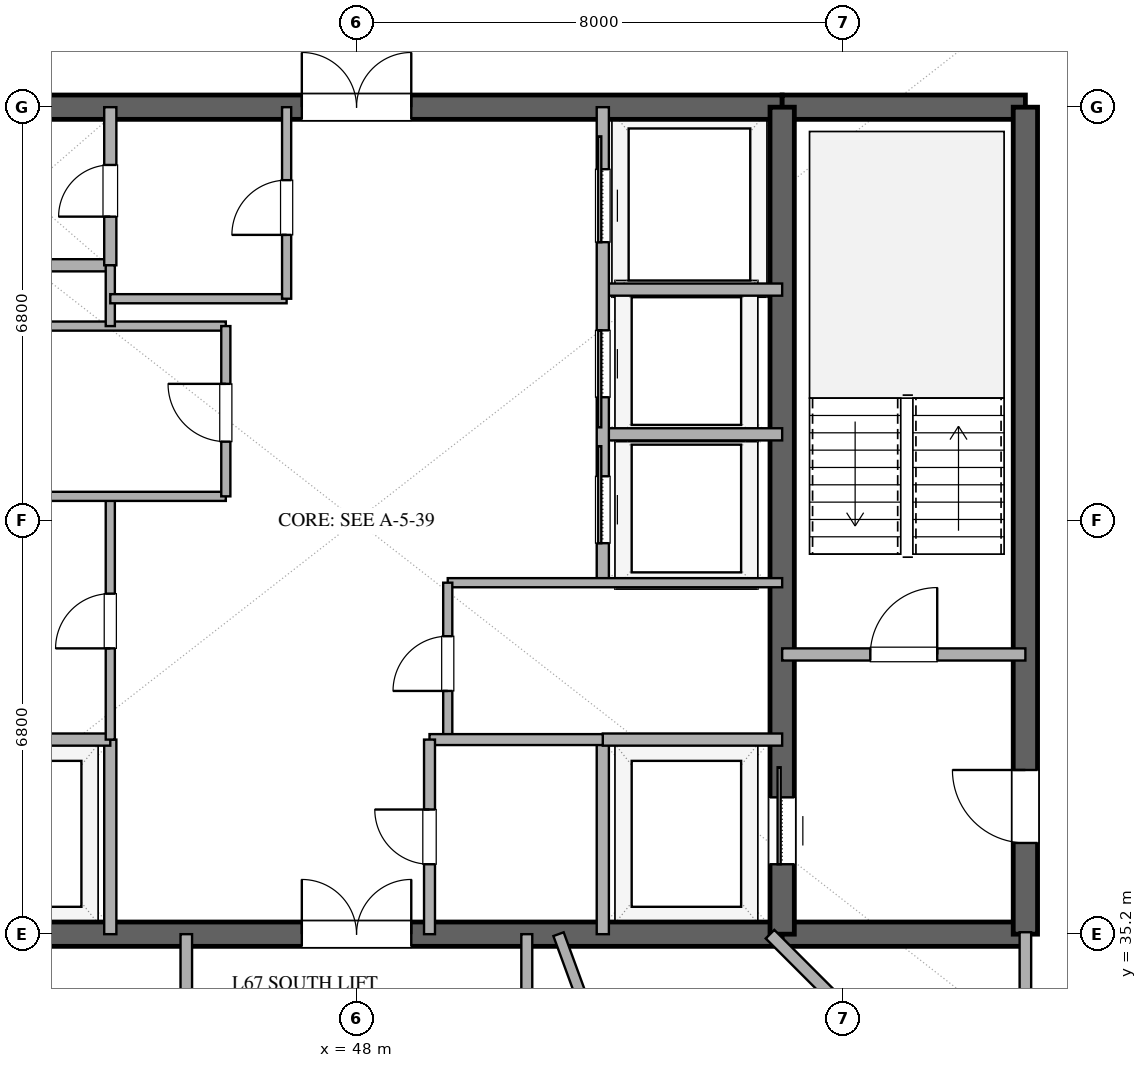
"""IFC4 building model, lengths in metres.
Left out: names, types, materials, properties, quantities, classifications, styles, units other than length and angle.
Written with IfcOpenShell. Run it as: python <this file> out.ifc"""

import sys

from ifc_helpers import new_model, si_unit, direction, frame, frame_2d, origin, place, context, subcontext, project, spatial, rectangle, extrude, element, fill, save


model = new_model("IFC4")
c1 = context("Model", 3, precision=1e-05, world=origin(), true_north=direction((0.0, 1.0)))
c2 = subcontext(c1, "Body", "Model", "MODEL_VIEW")
j1 = project(units=[si_unit("LENGTHUNIT", "METRE"), si_unit("PLANEANGLEUNIT", "RADIAN")], contexts=[c1])
p1 = place(None, origin())
s1 = spatial("IfcSite", under=j1, at=p1, CompositionType="ELEMENT")
p2 = place(p1, origin())
s2 = spatial("IfcBuilding", under=s1, at=p2, CompositionType="ELEMENT")
p3 = place(p2, frame((0.0, 0.0, 262.2)))
s3 = spatial("IfcBuildingStorey", under=s2, at=p3, CompositionType="ELEMENT", Elevation=262.2)
p4 = place(p3, frame((41.0, 35.2, 0.0), z_axis=(0.0, 0.0, 1.0), x_axis=(1.0, 0.0, 0.0)))
e1 = element("IfcWall", 1, at=p4, inside=s3, PredefinedType="SHEAR", context=c2, shape_type="SweptSolid", body=[
    extrude(rectangle(XDim=14.0, YDim=0.4, at=frame_2d((7.0, 0.0))), origin(), (0.0, 0.0, 1.0), 3.37),
])
p5 = place(p4, frame((6.1, 0.0, 0.0)))
e2 = element("IfcOpeningElement", 2, at=p5, cuts=e1, PredefinedType="OPENING", context=c2, shape_type="SweptSolid", body=[
    extrude(rectangle(XDim=1.8, YDim=2.25, at=frame_2d((0.9, 1.125))), frame((0.0, 0.21, 0.0), z_axis=(0.0, -1.0, 0.0), x_axis=(1.0, 0.0, 0.0)), (0.0, 0.0, 1.0), 0.42),
])
p6 = place(p3, frame((55.0, 35.2, 0.0), z_axis=(0.0, 0.0, 1.0), x_axis=(1.0, 0.0, 0.0)))
e3 = element("IfcWall", 3, at=p6, inside=s3, PredefinedType="SHEAR", context=c2, shape_type="SweptSolid", body=[
    extrude(rectangle(XDim=4.0, YDim=0.4, at=frame_2d((2.0, 0.0))), origin(), (0.0, 0.0, 1.0), 3.37),
])
p7 = place(p3, frame((41.0, 48.8, 0.0), z_axis=(0.0, 0.0, 1.0), x_axis=(1.0, 0.0, 0.0)))
e4 = element("IfcWall", 4, at=p7, inside=s3, PredefinedType="SHEAR", context=c2, shape_type="SweptSolid", body=[
    extrude(rectangle(XDim=14.0, YDim=0.4, at=frame_2d((7.0, 0.0))), origin(), (0.0, 0.0, 1.0), 3.37),
])
p8 = place(p7, frame((6.1, 0.0, 0.0)))
e5 = element("IfcOpeningElement", 5, at=p8, cuts=e4, PredefinedType="OPENING", context=c2, shape_type="SweptSolid", body=[
    extrude(rectangle(XDim=1.8, YDim=2.25, at=frame_2d((0.9, 1.125))), frame((0.0, 0.21, 0.0), z_axis=(0.0, -1.0, 0.0), x_axis=(1.0, 0.0, 0.0)), (0.0, 0.0, 1.0), 0.42),
])
p9 = place(p3, frame((55.0, 48.8, 0.0), z_axis=(0.0, 0.0, 1.0), x_axis=(1.0, 0.0, 0.0)))
e6 = element("IfcWall", 6, at=p9, inside=s3, PredefinedType="SHEAR", context=c2, shape_type="SweptSolid", body=[
    extrude(rectangle(XDim=4.0, YDim=0.4, at=frame_2d((2.0, 0.0))), origin(), (0.0, 0.0, 1.0), 3.37),
])
p10 = place(p3, frame((59.0, 35.2, 0.0), z_axis=(0.0, 0.0, 1.0), x_axis=(0.0, 1.0, 0.0)))
e7 = element("IfcWall", 7, at=p10, inside=s3, PredefinedType="SHEAR", context=c2, shape_type="SweptSolid", body=[
    extrude(rectangle(XDim=13.6, YDim=0.4, at=frame_2d((6.8, 0.0))), origin(), (0.0, 0.0, 1.0), 3.37),
])
p11 = place(p10, frame((1.5, 0.0, 0.0)))
e8 = element("IfcOpeningElement", 8, at=p11, cuts=e7, PredefinedType="OPENING", context=c2, shape_type="SweptSolid", body=[
    extrude(rectangle(XDim=1.2, YDim=2.15, at=frame_2d((0.6, 1.075))), frame((0.0, 0.21, 0.0), z_axis=(0.0, -1.0, 0.0), x_axis=(1.0, 0.0, 0.0)), (0.0, 0.0, 1.0), 0.42),
])
p12 = place(p3, frame((55.0, 35.2, 0.0), z_axis=(0.0, 0.0, 1.0), x_axis=(0.0, 1.0, 0.0)))
e9 = element("IfcWall", 9, at=p12, inside=s3, PredefinedType="SHEAR", context=c2, shape_type="SweptSolid", body=[
    extrude(rectangle(XDim=13.6, YDim=0.4, at=frame_2d((6.8, 0.0))), origin(), (0.0, 0.0, 1.0), 3.37),
])
p13 = place(p12, frame((1.15, 0.0, 0.0)))
e10 = element("IfcOpeningElement", 10, at=p13, cuts=e9, PredefinedType="OPENING", context=c2, shape_type="SweptSolid", body=[
    extrude(rectangle(XDim=1.1, YDim=2.2, at=frame_2d((0.55, 1.1))), frame((0.0, 0.21, 0.0), z_axis=(0.0, -1.0, 0.0), x_axis=(1.0, 0.0, 0.0)), (0.0, 0.0, 1.0), 0.42),
])
p14 = place(p3, frame((55.0, 39.8, 0.0), z_axis=(0.0, 0.0, 1.0), x_axis=(1.0, 0.0, 0.0)))
e11 = element("IfcWall", 11, at=p14, inside=s3, PredefinedType="SOLIDWALL", context=c2, shape_type="SweptSolid", body=[
    extrude(rectangle(XDim=4.0, YDim=0.2, at=frame_2d((2.0, 0.0))), origin(), (0.0, 0.0, 1.0), 2.73),
])
p15 = place(p14, frame((1.45, 0.0, 0.0)))
e12 = element("IfcOpeningElement", 12, at=p15, cuts=e11, PredefinedType="OPENING", context=c2, shape_type="SweptSolid", body=[
    extrude(rectangle(XDim=1.1, YDim=2.15, at=frame_2d((0.55, 1.075))), frame((0.0, 0.11, 0.0), z_axis=(0.0, -1.0, 0.0), x_axis=(1.0, 0.0, 0.0)), (0.0, 0.0, 1.0), 0.22),
])
p16 = place(p3, frame((43.95, 35.2, 0.0), z_axis=(0.0, 0.0, 1.0), x_axis=(0.0, 1.0, 0.0)))
e13 = element("IfcWall", 13, at=p16, inside=s3, PredefinedType="SOLIDWALL", context=c2, shape_type="SweptSolid", body=[
    extrude(rectangle(XDim=3.2, YDim=0.2, at=frame_2d((1.6, 0.0))), origin(), (0.0, 0.0, 1.0), 2.73),
])
p17 = place(p3, frame((41.0, 38.4, 0.0), z_axis=(0.0, 0.0, 1.0), x_axis=(1.0, 0.0, 0.0)))
e14 = element("IfcWall", 14, at=p17, inside=s3, PredefinedType="SOLIDWALL", context=c2, shape_type="SweptSolid", body=[
    extrude(rectangle(XDim=2.95, YDim=0.2, at=frame_2d((1.475, 0.0))), origin(), (0.0, 0.0, 1.0), 2.73),
])
p18 = place(p3, frame((52.05, 35.2, 0.0), z_axis=(0.0, 0.0, 1.0), x_axis=(0.0, 1.0, 0.0)))
e15 = element("IfcWall", 15, at=p18, inside=s3, PredefinedType="SOLIDWALL", context=c2, shape_type="SweptSolid", body=[
    extrude(rectangle(XDim=3.2, YDim=0.2, at=frame_2d((1.6, 0.0))), origin(), (0.0, 0.0, 1.0), 2.73),
])
for number, where, z_axis, x_axis in (
    (16, (52.05, 38.4, 0.0), (0.0, 0.0, 1.0), (1.0, 0.0, 0.0)),
    (17, (41.0, 46.2, 0.0), (0.0, 0.0, 1.0), (1.0, 0.0, 0.0)),
):
    element("IfcWall", number, at=place(p3, frame(where, z_axis=z_axis, x_axis=x_axis)), inside=s3, PredefinedType="SOLIDWALL", context=c2, shape_type="SweptSolid", body=[
        extrude(rectangle(XDim=2.95, YDim=0.2, at=frame_2d((1.475, 0.0))), origin(), (0.0, 0.0, 1.0), 2.73),
    ])
p19 = place(p3, frame((43.95, 46.2, 0.0), z_axis=(0.0, 0.0, 1.0), x_axis=(0.0, 1.0, 0.0)))
e18 = element("IfcWall", 18, at=p19, inside=s3, PredefinedType="SOLIDWALL", context=c2, shape_type="SweptSolid", body=[
    extrude(rectangle(XDim=2.6, YDim=0.2, at=frame_2d((1.3, 0.0))), origin(), (0.0, 0.0, 1.0), 2.73),
])
p20 = place(p19, frame((0.8, 0.0, 0.0)))
e19 = element("IfcOpeningElement", 19, at=p20, cuts=e18, PredefinedType="OPENING", context=c2, shape_type="SweptSolid", body=[
    extrude(rectangle(XDim=0.85, YDim=2.15, at=frame_2d((0.425, 1.075))), frame((0.0, 0.11, 0.0), z_axis=(0.0, -1.0, 0.0), x_axis=(1.0, 0.0, 0.0)), (0.0, 0.0, 1.0), 0.22),
])
p21 = place(p3, frame((43.95, 38.4, 0.0), z_axis=(0.0, 0.0, 1.0), x_axis=(0.0, 1.0, 0.0)))
e20 = element("IfcWall", 20, at=p21, inside=s3, PredefinedType="PARTITIONING", context=c2, shape_type="SweptSolid", body=[
    extrude(rectangle(XDim=4.0, YDim=0.15, at=frame_2d((2.0, 0.0))), origin(), (0.0, 0.0, 1.0), 2.73),
])
p22 = place(p21, frame((1.5, 0.0, 0.0)))
e21 = element("IfcOpeningElement", 21, at=p22, cuts=e20, PredefinedType="OPENING", context=c2, shape_type="SweptSolid", body=[
    extrude(rectangle(XDim=0.9, YDim=2.15, at=frame_2d((0.45, 1.075))), frame((0.0, 0.085, 0.0), z_axis=(0.0, -1.0, 0.0), x_axis=(1.0, 0.0, 0.0)), (0.0, 0.0, 1.0), 0.17),
])
for number, where, z_axis, x_axis in (
    (22, (41.0, 42.4, 0.0), (0.0, 0.0, 1.0), (1.0, 0.0, 0.0)),
    (23, (41.0, 45.2, 0.0), (0.0, 0.0, 1.0), (1.0, 0.0, 0.0)),
):
    element("IfcWall", number, at=place(p3, frame(where, z_axis=z_axis, x_axis=x_axis)), inside=s3, PredefinedType="PARTITIONING", context=c2, shape_type="SweptSolid", body=[
        extrude(rectangle(XDim=4.85, YDim=0.15, at=frame_2d((2.425, 0.0))), origin(), (0.0, 0.0, 1.0), 2.73),
    ])
p23 = place(p3, frame((43.95, 45.2, 0.0), z_axis=(0.0, 0.0, 1.0), x_axis=(0.0, 1.0, 0.0)))
e24 = element("IfcWall", 24, at=p23, inside=s3, PredefinedType="PARTITIONING", context=c2, shape_type="SweptSolid", body=[
    extrude(rectangle(XDim=1.0, YDim=0.15, at=frame_2d((0.5, 0.0))), origin(), (0.0, 0.0, 1.0), 2.73),
])
p24 = place(p3, frame((45.85, 42.4, 0.0), z_axis=(0.0, 0.0, 1.0), x_axis=(0.0, 1.0, 0.0)))
e25 = element("IfcWall", 25, at=p24, inside=s3, PredefinedType="PARTITIONING", context=c2, shape_type="SweptSolid", body=[
    extrude(rectangle(XDim=2.8, YDim=0.15, at=frame_2d((1.4, 0.0))), origin(), (0.0, 0.0, 1.0), 2.73),
])
p25 = place(p24, frame((0.9, 0.0, 0.0)))
e26 = element("IfcOpeningElement", 26, at=p25, cuts=e25, PredefinedType="OPENING", context=c2, shape_type="SweptSolid", body=[
    extrude(rectangle(XDim=0.95, YDim=2.15, at=frame_2d((0.475, 1.075))), frame((0.0, 0.085, 0.0), z_axis=(0.0, -1.0, 0.0), x_axis=(1.0, 0.0, 0.0)), (0.0, 0.0, 1.0), 0.17),
])
for number, where, z_axis, x_axis in (
    (27, (52.05, 43.42, 0.0), (0.0, 0.0, 1.0), (1.0, 0.0, 0.0)),
    (28, (52.05, 45.8, 0.0), (0.0, 0.0, 1.0), (1.0, 0.0, 0.0)),
):
    element("IfcWall", number, at=place(p3, frame(where, z_axis=z_axis, x_axis=x_axis)), inside=s3, PredefinedType="SOLIDWALL", context=c2, shape_type="SweptSolid", body=[
        extrude(rectangle(XDim=2.95, YDim=0.2, at=frame_2d((1.475, 0.0))), origin(), (0.0, 0.0, 1.0), 2.73),
    ])
p26 = place(p3, frame((52.05, 40.98, 0.0), z_axis=(0.0, 0.0, 1.0), x_axis=(0.0, 1.0, 0.0)))
e29 = element("IfcWall", 29, at=p26, inside=s3, PredefinedType="SOLIDWALL", context=c2, shape_type="SweptSolid", body=[
    extrude(rectangle(XDim=7.82, YDim=0.2, at=frame_2d((3.91, 0.0))), origin(), (0.0, 0.0, 1.0), 2.73),
])
p27 = place(p26, frame((0.65, 0.0, 0.0)))
e30 = element("IfcOpeningElement", 30, at=p27, cuts=e29, PredefinedType="OPENING", context=c2, shape_type="SweptSolid", body=[
    extrude(rectangle(XDim=1.1, YDim=2.2, at=frame_2d((0.55, 1.1))), frame((0.0, 0.11, 0.0), z_axis=(0.0, -1.0, 0.0), x_axis=(1.0, 0.0, 0.0)), (0.0, 0.0, 1.0), 0.22),
])
p28 = place(p26, frame((3.05, 0.0, 0.0)))
e31 = element("IfcOpeningElement", 31, at=p28, cuts=e29, PredefinedType="OPENING", context=c2, shape_type="SweptSolid", body=[
    extrude(rectangle(XDim=1.1, YDim=2.2, at=frame_2d((0.55, 1.1))), frame((0.0, 0.11, 0.0), z_axis=(0.0, -1.0, 0.0), x_axis=(1.0, 0.0, 0.0)), (0.0, 0.0, 1.0), 0.22),
])
p29 = place(p26, frame((5.6, 0.0, 0.0)))
e32 = element("IfcOpeningElement", 32, at=p29, cuts=e29, PredefinedType="OPENING", context=c2, shape_type="SweptSolid", body=[
    extrude(rectangle(XDim=1.2, YDim=2.2, at=frame_2d((0.6, 1.1))), frame((0.0, 0.11, 0.0), z_axis=(0.0, -1.0, 0.0), x_axis=(1.0, 0.0, 0.0)), (0.0, 0.0, 1.0), 0.22),
])
p30 = place(p3, frame((49.5, 40.98, 0.0), z_axis=(0.0, 0.0, 1.0), x_axis=(1.0, 0.0, 0.0)))
e33 = element("IfcWall", 33, at=p30, inside=s3, PredefinedType="PARTITIONING", context=c2, shape_type="SweptSolid", body=[
    extrude(rectangle(XDim=5.5, YDim=0.15, at=frame_2d((2.75, 0.0))), origin(), (0.0, 0.0, 1.0), 2.73),
])
p31 = place(p3, frame((49.5, 38.4, 0.0), z_axis=(0.0, 0.0, 1.0), x_axis=(0.0, 1.0, 0.0)))
e34 = element("IfcWall", 34, at=p31, inside=s3, PredefinedType="PARTITIONING", context=c2, shape_type="SweptSolid", body=[
    extrude(rectangle(XDim=2.58, YDim=0.15, at=frame_2d((1.29, 0.0))), origin(), (0.0, 0.0, 1.0), 2.73),
])
p32 = place(p31, frame((0.8, 0.0, 0.0)))
e35 = element("IfcOpeningElement", 35, at=p32, cuts=e34, PredefinedType="OPENING", context=c2, shape_type="SweptSolid", body=[
    extrude(rectangle(XDim=0.9, YDim=2.15, at=frame_2d((0.45, 1.075))), frame((0.0, 0.085, 0.0), z_axis=(0.0, -1.0, 0.0), x_axis=(1.0, 0.0, 0.0)), (0.0, 0.0, 1.0), 0.17),
])
p33 = place(p3, frame((43.95, 45.65, 0.0), z_axis=(0.0, 0.0, 1.0), x_axis=(1.0, 0.0, 0.0)))
e36 = element("IfcWall", 36, at=p33, inside=s3, PredefinedType="PARTITIONING", context=c2, shape_type="SweptSolid", body=[
    extrude(rectangle(XDim=2.9, YDim=0.15, at=frame_2d((1.45, 0.0))), origin(), (0.0, 0.0, 1.0), 2.73),
])
p34 = place(p3, frame((46.85, 45.65, 0.0), z_axis=(0.0, 0.0, 1.0), x_axis=(0.0, 1.0, 0.0)))
e37 = element("IfcWall", 37, at=p34, inside=s3, PredefinedType="PARTITIONING", context=c2, shape_type="SweptSolid", body=[
    extrude(rectangle(XDim=3.15, YDim=0.15, at=frame_2d((1.575, 0.0))), origin(), (0.0, 0.0, 1.0), 2.73),
])
p35 = place(p34, frame((1.05, 0.0, 0.0)))
e38 = element("IfcOpeningElement", 38, at=p35, cuts=e37, PredefinedType="OPENING", context=c2, shape_type="SweptSolid", body=[
    extrude(rectangle(XDim=0.9, YDim=2.15, at=frame_2d((0.45, 1.075))), frame((0.0, 0.085, 0.0), z_axis=(0.0, -1.0, 0.0), x_axis=(1.0, 0.0, 0.0)), (0.0, 0.0, 1.0), 0.17),
])
p36 = place(p3, frame((49.2, 38.4, 0.0), z_axis=(0.0, 0.0, 1.0), x_axis=(1.0, 0.0, 0.0)))
e39 = element("IfcWall", 39, at=p36, inside=s3, PredefinedType="PLUMBINGWALL", context=c2, shape_type="SweptSolid", body=[
    extrude(rectangle(XDim=2.85, YDim=0.18, at=frame_2d((1.425, 0.0))), origin(), (0.0, 0.0, 1.0), 2.73),
])
p37 = place(p3, frame((49.2, 35.2, 0.0), z_axis=(0.0, 0.0, 1.0), x_axis=(0.0, 1.0, 0.0)))
e40 = element("IfcWall", 40, at=p37, inside=s3, PredefinedType="PLUMBINGWALL", context=c2, shape_type="SweptSolid", body=[
    extrude(rectangle(XDim=3.2, YDim=0.18, at=frame_2d((1.6, 0.0))), origin(), (0.0, 0.0, 1.0), 2.73),
])
p38 = place(p37, frame((1.15, 0.0, 0.0)))
e41 = element("IfcOpeningElement", 41, at=p38, cuts=e40, PredefinedType="OPENING", context=c2, shape_type="SweptSolid", body=[
    extrude(rectangle(XDim=0.9, YDim=2.1, at=frame_2d((0.45, 1.05))), frame((0.0, 0.1, 0.0), z_axis=(0.0, -1.0, 0.0), x_axis=(1.0, 0.0, 0.0)), (0.0, 0.0, 1.0), 0.2),
])
p39 = place(p3, frame((63.561, 26.439, 0.0), z_axis=(0.0, 0.0, 1.0), x_axis=(-0.707106781187, 0.707106781187, 0.0)))
e42 = element("IfcWall", 42, at=p39, inside=s3, PredefinedType="PARTITIONING", context=c2, shape_type="SweptSolid", body=[
    extrude(rectangle(XDim=12.389, YDim=0.2, at=frame_2d((6.195, 0.0))), origin(), (0.0, 0.0, 1.0), 2.73),
])
p40 = place(p3, frame((51.322, 35.2, 0.0), z_axis=(0.0, 0.0, 1.0), x_axis=(0.343730484072, -0.939068343796, 0.0)))
e43 = element("IfcWall", 43, at=p40, inside=s3, PredefinedType="PLUMBINGWALL", context=c2, shape_type="SweptSolid", body=[
    extrude(rectangle(XDim=7.897, YDim=0.18, at=frame_2d((3.949, 0.0))), origin(), (0.0, 0.0, 1.0), 2.73),
])
p41 = place(p40, frame((3.524, 0.0, 0.0)))
e44 = element("IfcOpeningElement", 44, at=p41, cuts=e43, PredefinedType="OPENING", context=c2, shape_type="SweptSolid", body=[
    extrude(rectangle(XDim=0.85, YDim=2.1, at=frame_2d((0.425, 1.05))), frame((0.0, 0.1, 0.0), z_axis=(0.0, -1.0, 0.0), x_axis=(1.0, 0.0, 0.0)), (0.0, 0.0, 1.0), 0.2),
])
p42 = place(p3, frame((45.2, 35.2, 0.0), z_axis=(0.0, 0.0, 1.0), x_axis=(0.0, -1.0, 0.0)))
e45 = element("IfcWall", 45, at=p42, inside=s3, PredefinedType="PARTITIONING", context=c2, shape_type="SweptSolid", body=[
    extrude(rectangle(XDim=2.1, YDim=0.19, at=frame_2d((1.05, 0.0))), origin(), (0.0, 0.0, 1.0), 2.73),
])
p43 = place(p3, frame((50.8, 35.2, 0.0), z_axis=(0.0, 0.0, 1.0), x_axis=(0.0, -1.0, 0.0)))
e46 = element("IfcWall", 46, at=p43, inside=s3, PredefinedType="PLUMBINGWALL", context=c2, shape_type="SweptSolid", body=[
    extrude(rectangle(XDim=2.1, YDim=0.18, at=frame_2d((1.05, 0.0))), origin(), (0.0, 0.0, 1.0), 2.73),
])
p44 = place(p3, frame((59.0, 34.0, 0.0), z_axis=(0.0, 0.0, 1.0), x_axis=(0.0, 1.0, 0.0)))
e47 = element("IfcWall", 47, at=p44, inside=s3, PredefinedType="PARTITIONING", context=c2, shape_type="SweptSolid", body=[
    extrude(rectangle(XDim=1.232, YDim=0.19, at=frame_2d((0.616, 0.0))), origin(), (0.0, 0.0, 1.0), 2.73),
])
p45 = place(p13, origin())
e48 = element("IfcDoor", 48, at=p45, inside=s3, OperationType="SLIDING_TO_RIGHT", PredefinedType="DOOR", context=c2, shape_type="SweptSolid", body=[
    extrude(rectangle(XDim=1.1, YDim=2.2, at=frame_2d((0.55, 1.1))), frame((0.0, 0.025, 0.0), z_axis=(0.0, -1.0, 0.0), x_axis=(1.0, 0.0, 0.0)), (0.0, 0.0, 1.0), 0.05),
])
fill(e10, e48)
p46 = place(p11, origin())
e49 = element("IfcDoor", 49, at=p46, inside=s3, OperationType="SINGLE_SWING_RIGHT", PredefinedType="DOOR", context=c2, shape_type="SweptSolid", body=[
    extrude(rectangle(XDim=1.2, YDim=2.15, at=frame_2d((0.6, 1.075))), frame((0.0, 0.025, 0.0), z_axis=(0.0, -1.0, 0.0), x_axis=(1.0, 0.0, 0.0)), (0.0, 0.0, 1.0), 0.05),
])
fill(e8, e49)
p47 = place(p5, origin())
e50 = element("IfcDoor", 50, at=p47, inside=s3, OperationType="DOUBLE_DOOR_SINGLE_SWING", PredefinedType="DOOR", context=c2, shape_type="SweptSolid", body=[
    extrude(rectangle(XDim=1.8, YDim=2.25, at=frame_2d((0.9, 1.125))), frame((0.0, 0.025, 0.0), z_axis=(0.0, -1.0, 0.0), x_axis=(1.0, 0.0, 0.0)), (0.0, 0.0, 1.0), 0.05),
])
fill(e2, e50)
p48 = place(p8, origin())
e51 = element("IfcDoor", 51, at=p48, inside=s3, OperationType="DOUBLE_DOOR_SINGLE_SWING", PredefinedType="DOOR", context=c2, shape_type="SweptSolid", body=[
    extrude(rectangle(XDim=1.8, YDim=2.25, at=frame_2d((0.9, 1.125))), frame((0.0, 0.025, 0.0), z_axis=(0.0, -1.0, 0.0), x_axis=(1.0, 0.0, 0.0)), (0.0, 0.0, 1.0), 0.05),
])
fill(e5, e51)
p49 = place(p15, origin())
e52 = element("IfcDoor", 52, at=p49, inside=s3, OperationType="SINGLE_SWING_RIGHT", PredefinedType="DOOR", context=c2, shape_type="SweptSolid", body=[
    extrude(rectangle(XDim=1.1, YDim=2.15, at=frame_2d((0.55, 1.075))), frame((0.0, 0.025, 0.0), z_axis=(0.0, -1.0, 0.0), x_axis=(1.0, 0.0, 0.0)), (0.0, 0.0, 1.0), 0.05),
])
fill(e12, e52)
p50 = place(p20, origin())
e53 = element("IfcDoor", 53, at=p50, inside=s3, OperationType="SINGLE_SWING_LEFT", PredefinedType="DOOR", context=c2, shape_type="SweptSolid", body=[
    extrude(rectangle(XDim=0.85, YDim=2.15, at=frame_2d((0.425, 1.075))), frame((0.0, 0.025, 0.0), z_axis=(0.0, -1.0, 0.0), x_axis=(1.0, 0.0, 0.0)), (0.0, 0.0, 1.0), 0.05),
])
fill(e19, e53)
p51 = place(p22, origin())
e54 = element("IfcDoor", 54, at=p51, inside=s3, OperationType="SINGLE_SWING_LEFT", PredefinedType="DOOR", context=c2, shape_type="SweptSolid", body=[
    extrude(rectangle(XDim=0.9, YDim=2.15, at=frame_2d((0.45, 1.075))), frame((0.0, 0.025, 0.0), z_axis=(0.0, -1.0, 0.0), x_axis=(1.0, 0.0, 0.0)), (0.0, 0.0, 1.0), 0.05),
])
fill(e21, e54)
p52 = place(p25, origin())
e55 = element("IfcDoor", 55, at=p52, inside=s3, OperationType="SINGLE_SWING_RIGHT", PredefinedType="DOOR", context=c2, shape_type="SweptSolid", body=[
    extrude(rectangle(XDim=0.95, YDim=2.15, at=frame_2d((0.475, 1.075))), frame((0.0, 0.025, 0.0), z_axis=(0.0, -1.0, 0.0), x_axis=(1.0, 0.0, 0.0)), (0.0, 0.0, 1.0), 0.05),
])
fill(e26, e55)
p53 = place(p27, origin())
e56 = element("IfcDoor", 56, at=p53, inside=s3, OperationType="SLIDING_TO_RIGHT", PredefinedType="DOOR", context=c2, shape_type="SweptSolid", body=[
    extrude(rectangle(XDim=1.1, YDim=2.2, at=frame_2d((0.55, 1.1))), frame((0.0, 0.025, 0.0), z_axis=(0.0, -1.0, 0.0), x_axis=(1.0, 0.0, 0.0)), (0.0, 0.0, 1.0), 0.05),
])
fill(e30, e56)
p54 = place(p28, origin())
e57 = element("IfcDoor", 57, at=p54, inside=s3, OperationType="SLIDING_TO_LEFT", PredefinedType="DOOR", context=c2, shape_type="SweptSolid", body=[
    extrude(rectangle(XDim=1.1, YDim=2.2, at=frame_2d((0.55, 1.1))), frame((0.0, 0.025, 0.0), z_axis=(0.0, -1.0, 0.0), x_axis=(1.0, 0.0, 0.0)), (0.0, 0.0, 1.0), 0.05),
])
fill(e31, e57)
p55 = place(p29, origin())
e58 = element("IfcDoor", 58, at=p55, inside=s3, OperationType="SLIDING_TO_RIGHT", PredefinedType="DOOR", context=c2, shape_type="SweptSolid", body=[
    extrude(rectangle(XDim=1.2, YDim=2.2, at=frame_2d((0.6, 1.1))), frame((0.0, 0.025, 0.0), z_axis=(0.0, -1.0, 0.0), x_axis=(1.0, 0.0, 0.0)), (0.0, 0.0, 1.0), 0.05),
])
fill(e32, e58)
p56 = place(p32, origin())
e59 = element("IfcDoor", 59, at=p56, inside=s3, OperationType="SINGLE_SWING_LEFT", PredefinedType="DOOR", context=c2, shape_type="SweptSolid", body=[
    extrude(rectangle(XDim=0.9, YDim=2.15, at=frame_2d((0.45, 1.075))), frame((0.0, 0.025, 0.0), z_axis=(0.0, -1.0, 0.0), x_axis=(1.0, 0.0, 0.0)), (0.0, 0.0, 1.0), 0.05),
])
fill(e35, e59)
p57 = place(p35, origin())
e60 = element("IfcDoor", 60, at=p57, inside=s3, OperationType="SINGLE_SWING_LEFT", PredefinedType="DOOR", context=c2, shape_type="SweptSolid", body=[
    extrude(rectangle(XDim=0.9, YDim=2.15, at=frame_2d((0.45, 1.075))), frame((0.0, 0.025, 0.0), z_axis=(0.0, -1.0, 0.0), x_axis=(1.0, 0.0, 0.0)), (0.0, 0.0, 1.0), 0.05),
])
fill(e38, e60)
p58 = place(p38, origin())
e61 = element("IfcDoor", 61, at=p58, inside=s3, OperationType="SINGLE_SWING_RIGHT", PredefinedType="DOOR", context=c2, shape_type="SweptSolid", body=[
    extrude(rectangle(XDim=0.9, YDim=2.1, at=frame_2d((0.45, 1.05))), frame((0.0, 0.025, 0.0), z_axis=(0.0, -1.0, 0.0), x_axis=(1.0, 0.0, 0.0)), (0.0, 0.0, 1.0), 0.05),
])
fill(e41, e61)
save(model, sys.argv[1])
